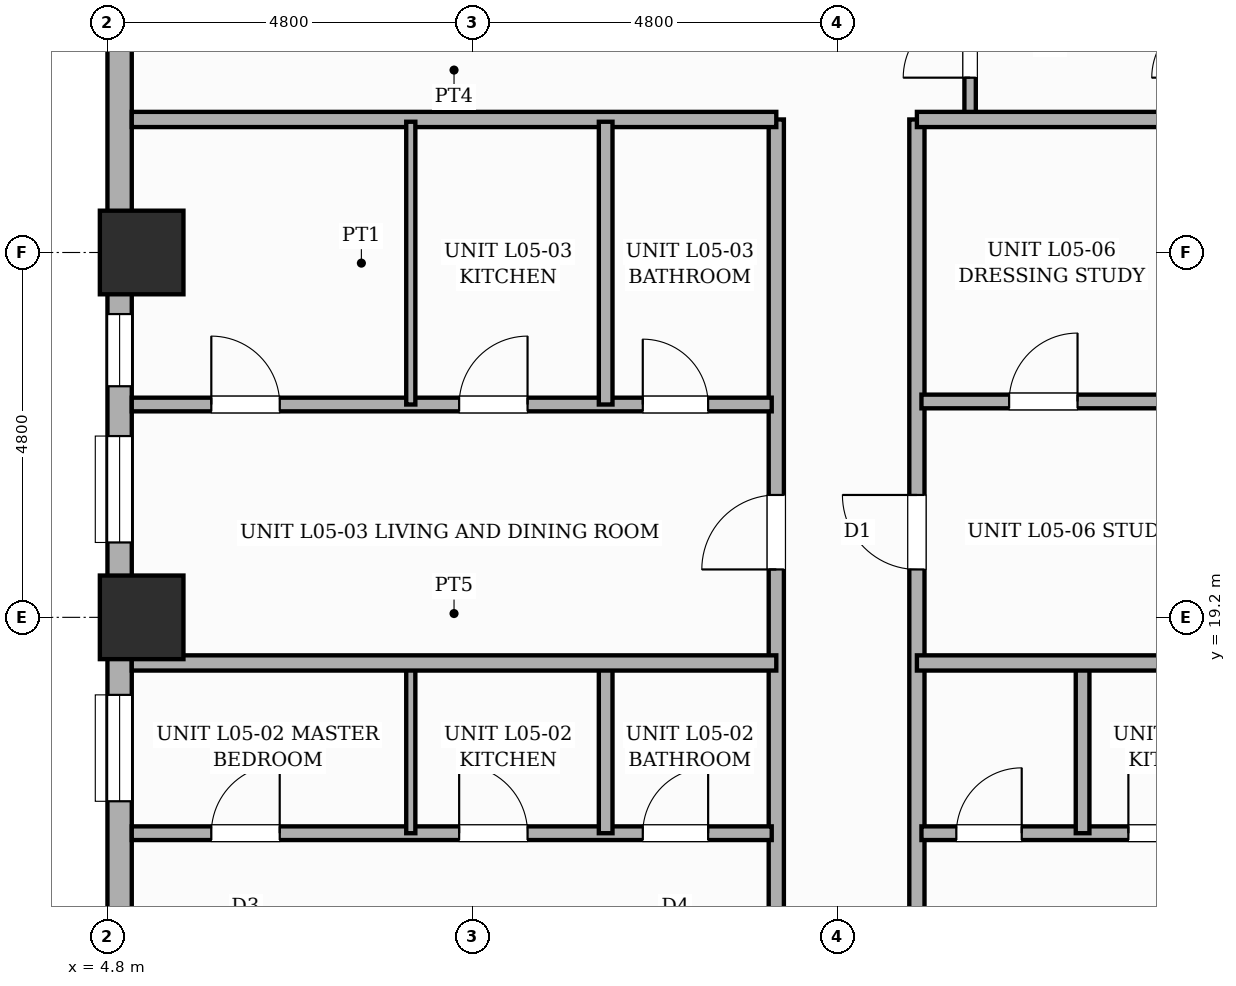
"""IFC4 building model, lengths in metres.
Left out: names, types, materials, properties, quantities, classifications, styles, units other than length and angle.
Written with IfcOpenShell. Run it as: python <this file> out.ifc"""

import sys

from ifc_helpers import new_model, si_unit, direction, frame, frame_2d, origin, origin_2d, place, context, subcontext, project, spatial, rectangle, extrude, element, fill, save


model = new_model("IFC4")
c1 = context("Model", 3, precision=1e-05, world=origin(), true_north=direction((0.0, 1.0)))
c2 = subcontext(c1, "Body", "Model", "MODEL_VIEW")
j1 = project(units=[si_unit("LENGTHUNIT", "METRE"), si_unit("PLANEANGLEUNIT", "RADIAN")], contexts=[c1])
p1 = place(None, origin())
s1 = spatial("IfcSite", under=j1, at=p1, CompositionType="ELEMENT")
p2 = place(p1, origin())
s2 = spatial("IfcBuilding", under=s1, at=p2, CompositionType="ELEMENT")
p3 = place(p2, frame((0.0, 0.0, 25.0)))
s3 = spatial("IfcBuildingStorey", under=s2, at=p3, CompositionType="ELEMENT", Elevation=25.0)
for number, where, z_axis, x_axis in (
    (1, (5.25, 19.2, 0.0), (0.0, 0.0, 1.0), (1.0, 0.0, 0.0)),
    (2, (5.25, 24.0, 0.0), (0.0, 0.0, 1.0), (1.0, 0.0, 0.0)),
):
    element("IfcColumn", number, at=place(p3, frame(where, z_axis=z_axis, x_axis=x_axis)), inside=s3, PredefinedType="COLUMN", context=c2, shape_type="SweptSolid", body=[
        extrude(rectangle(XDim=1.1, YDim=1.1, at=origin_2d()), origin(), (0.0, 0.0, 1.0), 3.6),
    ])
p4 = place(p3, frame((4.96, 7.2, 0.0), z_axis=(0.0, 0.0, 1.0), x_axis=(0.0, 1.0, 0.0)))
e3 = element("IfcWall", 3, at=p4, inside=s3, PredefinedType="STANDARD", context=c2, shape_type="SweptSolid", body=[
    extrude(rectangle(XDim=38.4, YDim=0.32, at=frame_2d((19.2, 0.0))), origin(), (0.0, 0.0, 1.0), 2.53),
])
p5 = place(p4, frame((0.635, 0.0, 0.45)))
e4 = element("IfcOpeningElement", 4, at=p5, cuts=e3, PredefinedType="OPENING", context=c2, shape_type="SweptSolid", body=[
    extrude(rectangle(XDim=0.95, YDim=1.8, at=frame_2d((0.475, 0.9))), frame((0.0, 0.17, 0.0), z_axis=(0.0, -1.0, 0.0), x_axis=(1.0, 0.0, 0.0)), (0.0, 0.0, 1.0), 0.34),
])
p6 = place(p4, frame((9.58, 0.0, 0.65)))
e5 = element("IfcOpeningElement", 5, at=p6, cuts=e3, PredefinedType="OPENING", context=c2, shape_type="SweptSolid", body=[
    extrude(rectangle(XDim=1.4, YDim=1.1, at=frame_2d((0.7, 0.55))), frame((0.0, 0.17, 0.0), z_axis=(0.0, -1.0, 0.0), x_axis=(1.0, 0.0, 0.0)), (0.0, 0.0, 1.0), 0.34),
])
p7 = place(p4, frame((15.04, 0.0, 0.45)))
e6 = element("IfcOpeningElement", 6, at=p7, cuts=e3, PredefinedType="OPENING", context=c2, shape_type="SweptSolid", body=[
    extrude(rectangle(XDim=0.95, YDim=1.8, at=frame_2d((0.475, 0.9))), frame((0.0, 0.17, 0.0), z_axis=(0.0, -1.0, 0.0), x_axis=(1.0, 0.0, 0.0)), (0.0, 0.0, 1.0), 0.34),
])
p8 = place(p4, frame((4.815, 0.0, 0.65)))
e7 = element("IfcOpeningElement", 7, at=p8, cuts=e3, PredefinedType="OPENING", context=c2, shape_type="SweptSolid", body=[
    extrude(rectangle(XDim=1.4, YDim=1.1, at=frame_2d((0.7, 0.55))), frame((0.0, 0.17, 0.0), z_axis=(0.0, -1.0, 0.0), x_axis=(1.0, 0.0, 0.0)), (0.0, 0.0, 1.0), 0.34),
])
p9 = place(p4, frame((12.985, 0.0, 0.65)))
e8 = element("IfcOpeningElement", 8, at=p9, cuts=e3, PredefinedType="OPENING", context=c2, shape_type="SweptSolid", body=[
    extrude(rectangle(XDim=1.4, YDim=1.1, at=frame_2d((0.7, 0.55))), frame((0.0, 0.17, 0.0), z_axis=(0.0, -1.0, 0.0), x_axis=(1.0, 0.0, 0.0)), (0.0, 0.0, 1.0), 0.34),
])
p10 = place(p3, frame((16.15, 25.75, 0.0), z_axis=(0.0, 0.0, 1.0), x_axis=(0.0, 1.0, 0.0)))
e9 = element("IfcWall", 9, at=p10, inside=s3, PredefinedType="PARTITIONING", context=c2, shape_type="SweptSolid", body=[
    extrude(rectangle(XDim=2.25, YDim=0.15, at=frame_2d((1.125, 0.0))), origin(), (0.0, 0.0, 1.0), 3.35),
])
p11 = place(p10, frame((0.55, 0.0, 0.0)))
e10 = element("IfcOpeningElement", 10, at=p11, cuts=e9, PredefinedType="OPENING", context=c2, shape_type="SweptSolid", body=[
    extrude(rectangle(XDim=0.88, YDim=2.1, at=frame_2d((0.44, 1.05))), frame((0.0, 0.085, 0.0), z_axis=(0.0, -1.0, 0.0), x_axis=(1.0, 0.0, 0.0)), (0.0, 0.0, 1.0), 0.17),
])
p12 = place(p3, frame((13.6, 5.12, 0.0), z_axis=(0.0, 0.0, 1.0), x_axis=(0.0, 1.0, 0.0)))
e11 = element("IfcWall", 11, at=p12, inside=s3, PredefinedType="PARTITIONING", context=c2, shape_type="SweptSolid", body=[
    extrude(rectangle(XDim=20.63, YDim=0.2, at=frame_2d((10.315, 0.0))), origin(), (0.0, 0.0, 1.0), 3.35),
])
p13 = place(p12, frame((1.025, 0.0, 0.0)))
e12 = element("IfcOpeningElement", 12, at=p13, cuts=e11, PredefinedType="OPENING", context=c2, shape_type="SweptSolid", body=[
    extrude(rectangle(XDim=0.98, YDim=2.18, at=frame_2d((0.49, 1.09))), frame((0.0, 0.11, 0.0), z_axis=(0.0, -1.0, 0.0), x_axis=(1.0, 0.0, 0.0)), (0.0, 0.0, 1.0), 0.22),
])
p14 = place(p12, frame((8.39, 0.0, 0.0)))
e13 = element("IfcOpeningElement", 13, at=p14, cuts=e11, PredefinedType="OPENING", context=c2, shape_type="SweptSolid", body=[
    extrude(rectangle(XDim=0.98, YDim=2.18, at=frame_2d((0.49, 1.09))), frame((0.0, 0.11, 0.0), z_axis=(0.0, -1.0, 0.0), x_axis=(1.0, 0.0, 0.0)), (0.0, 0.0, 1.0), 0.22),
])
p15 = place(p12, frame((14.71, 0.0, 0.0)))
e14 = element("IfcOpeningElement", 14, at=p15, cuts=e11, PredefinedType="OPENING", context=c2, shape_type="SweptSolid", body=[
    extrude(rectangle(XDim=0.98, YDim=2.18, at=frame_2d((0.49, 1.09))), frame((0.0, 0.11, 0.0), z_axis=(0.0, -1.0, 0.0), x_axis=(1.0, 0.0, 0.0)), (0.0, 0.0, 1.0), 0.22),
])
p16 = place(p3, frame((15.45, 5.12, 0.0), z_axis=(0.0, 0.0, 1.0), x_axis=(0.0, 1.0, 0.0)))
e15 = element("IfcWall", 15, at=p16, inside=s3, PredefinedType="PARTITIONING", context=c2, shape_type="SweptSolid", body=[
    extrude(rectangle(XDim=20.63, YDim=0.2, at=frame_2d((10.315, 0.0))), origin(), (0.0, 0.0, 1.0), 3.35),
])
p17 = place(p16, frame((1.025, 0.0, 0.0)))
e16 = element("IfcOpeningElement", 16, at=p17, cuts=e15, PredefinedType="OPENING", context=c2, shape_type="SweptSolid", body=[
    extrude(rectangle(XDim=0.98, YDim=2.18, at=frame_2d((0.49, 1.09))), frame((0.0, 0.11, 0.0), z_axis=(0.0, -1.0, 0.0), x_axis=(1.0, 0.0, 0.0)), (0.0, 0.0, 1.0), 0.22),
])
p18 = place(p16, frame((8.39, 0.0, 0.0)))
e17 = element("IfcOpeningElement", 17, at=p18, cuts=e15, PredefinedType="OPENING", context=c2, shape_type="SweptSolid", body=[
    extrude(rectangle(XDim=0.98, YDim=2.18, at=frame_2d((0.49, 1.09))), frame((0.0, 0.11, 0.0), z_axis=(0.0, -1.0, 0.0), x_axis=(1.0, 0.0, 0.0)), (0.0, 0.0, 1.0), 0.22),
])
p19 = place(p16, frame((14.71, 0.0, 0.0)))
e18 = element("IfcOpeningElement", 18, at=p19, cuts=e15, PredefinedType="OPENING", context=c2, shape_type="SweptSolid", body=[
    extrude(rectangle(XDim=0.98, YDim=2.18, at=frame_2d((0.49, 1.09))), frame((0.0, 0.11, 0.0), z_axis=(0.0, -1.0, 0.0), x_axis=(1.0, 0.0, 0.0)), (0.0, 0.0, 1.0), 0.22),
])
p20 = place(p3, frame((5.12, 25.75, 0.0), z_axis=(0.0, 0.0, 1.0), x_axis=(1.0, 0.0, 0.0)))
e19 = element("IfcWall", 19, at=p20, inside=s3, PredefinedType="PARTITIONING", context=c2, shape_type="SweptSolid", body=[
    extrude(rectangle(XDim=8.48, YDim=0.2, at=frame_2d((4.24, 0.0))), origin(), (0.0, 0.0, 1.0), 3.35),
])
p21 = place(p3, frame((15.45, 25.75, 0.0), z_axis=(0.0, 0.0, 1.0), x_axis=(1.0, 0.0, 0.0)))
e20 = element("IfcWall", 20, at=p21, inside=s3, PredefinedType="PARTITIONING", context=c2, shape_type="SweptSolid", body=[
    extrude(rectangle(XDim=8.23, YDim=0.2, at=frame_2d((4.115, 0.0))), origin(), (0.0, 0.0, 1.0), 3.35),
])
p22 = place(p3, frame((5.12, 16.36, 0.0), z_axis=(0.0, 0.0, 1.0), x_axis=(1.0, 0.0, 0.0)))
e21 = element("IfcWall", 21, at=p22, inside=s3, PredefinedType="PLUMBINGWALL", context=c2, shape_type="SweptSolid", body=[
    extrude(rectangle(XDim=8.42, YDim=0.18, at=frame_2d((4.21, 0.0))), origin(), (0.0, 0.0, 1.0), 3.35),
])
p23 = place(p22, frame((1.046, 0.0, 0.0)))
e22 = element("IfcOpeningElement", 22, at=p23, cuts=e21, PredefinedType="OPENING", context=c2, shape_type="SweptSolid", body=[
    extrude(rectangle(XDim=0.9, YDim=2.15, at=frame_2d((0.45, 1.075))), frame((0.0, 0.1, 0.0), z_axis=(0.0, -1.0, 0.0), x_axis=(1.0, 0.0, 0.0)), (0.0, 0.0, 1.0), 0.2),
])
p24 = place(p22, frame((4.307, 0.0, 0.0)))
e23 = element("IfcOpeningElement", 23, at=p24, cuts=e21, PredefinedType="OPENING", context=c2, shape_type="SweptSolid", body=[
    extrude(rectangle(XDim=0.9, YDim=2.15, at=frame_2d((0.45, 1.075))), frame((0.0, 0.1, 0.0), z_axis=(0.0, -1.0, 0.0), x_axis=(1.0, 0.0, 0.0)), (0.0, 0.0, 1.0), 0.2),
])
p25 = place(p22, frame((6.723, 0.0, 0.0)))
e24 = element("IfcOpeningElement", 24, at=p25, cuts=e21, PredefinedType="OPENING", context=c2, shape_type="SweptSolid", body=[
    extrude(rectangle(XDim=0.86, YDim=2.1, at=frame_2d((0.43, 1.05))), frame((0.0, 0.1, 0.0), z_axis=(0.0, -1.0, 0.0), x_axis=(1.0, 0.0, 0.0)), (0.0, 0.0, 1.0), 0.2),
])
p26 = place(p3, frame((8.791, 16.36, 0.0), z_axis=(0.0, 0.0, 1.0), x_axis=(0.0, 1.0, 0.0)))
e25 = element("IfcWall", 25, at=p26, inside=s3, PredefinedType="PARTITIONING", context=c2, shape_type="SweptSolid", body=[
    extrude(rectangle(XDim=2.28, YDim=0.12, at=frame_2d((1.14, 0.0))), origin(), (0.0, 0.0, 1.0), 3.35),
])
p27 = place(p3, frame((11.355, 16.36, 0.0), z_axis=(0.0, 0.0, 1.0), x_axis=(0.0, 1.0, 0.0)))
e26 = element("IfcWall", 26, at=p27, inside=s3, PredefinedType="PLUMBINGWALL", context=c2, shape_type="SweptSolid", body=[
    extrude(rectangle(XDim=2.28, YDim=0.18, at=frame_2d((1.14, 0.0))), origin(), (0.0, 0.0, 1.0), 3.35),
])
p28 = place(p3, frame((5.12, 18.6, 0.0), z_axis=(0.0, 0.0, 1.0), x_axis=(1.0, 0.0, 0.0)))
e27 = element("IfcWall", 27, at=p28, inside=s3, PredefinedType="SOLIDWALL", context=c2, shape_type="SweptSolid", body=[
    extrude(rectangle(XDim=8.48, YDim=0.2, at=frame_2d((4.24, 0.0))), origin(), (0.0, 0.0, 1.0), 3.35),
])
p29 = place(p3, frame((5.12, 22.0, 0.0), z_axis=(0.0, 0.0, 1.0), x_axis=(1.0, 0.0, 0.0)))
e28 = element("IfcWall", 28, at=p29, inside=s3, PredefinedType="PLUMBINGWALL", context=c2, shape_type="SweptSolid", body=[
    extrude(rectangle(XDim=8.42, YDim=0.18, at=frame_2d((4.21, 0.0))), origin(), (0.0, 0.0, 1.0), 3.35),
])
p30 = place(p29, frame((1.046, 0.0, 0.0)))
e29 = element("IfcOpeningElement", 29, at=p30, cuts=e28, PredefinedType="OPENING", context=c2, shape_type="SweptSolid", body=[
    extrude(rectangle(XDim=0.9, YDim=2.15, at=frame_2d((0.45, 1.075))), frame((0.0, 0.1, 0.0), z_axis=(0.0, -1.0, 0.0), x_axis=(1.0, 0.0, 0.0)), (0.0, 0.0, 1.0), 0.2),
])
p31 = place(p29, frame((4.307, 0.0, 0.0)))
e30 = element("IfcOpeningElement", 30, at=p31, cuts=e28, PredefinedType="OPENING", context=c2, shape_type="SweptSolid", body=[
    extrude(rectangle(XDim=0.9, YDim=2.15, at=frame_2d((0.45, 1.075))), frame((0.0, 0.1, 0.0), z_axis=(0.0, -1.0, 0.0), x_axis=(1.0, 0.0, 0.0)), (0.0, 0.0, 1.0), 0.2),
])
p32 = place(p29, frame((6.723, 0.0, 0.0)))
e31 = element("IfcOpeningElement", 31, at=p32, cuts=e28, PredefinedType="OPENING", context=c2, shape_type="SweptSolid", body=[
    extrude(rectangle(XDim=0.86, YDim=2.1, at=frame_2d((0.43, 1.05))), frame((0.0, 0.1, 0.0), z_axis=(0.0, -1.0, 0.0), x_axis=(1.0, 0.0, 0.0)), (0.0, 0.0, 1.0), 0.2),
])
p33 = place(p3, frame((8.791, 22.0, 0.0), z_axis=(0.0, 0.0, 1.0), x_axis=(0.0, 1.0, 0.0)))
e32 = element("IfcWall", 32, at=p33, inside=s3, PredefinedType="PARTITIONING", context=c2, shape_type="SweptSolid", body=[
    extrude(rectangle(XDim=3.72, YDim=0.12, at=frame_2d((1.86, 0.0))), origin(), (0.0, 0.0, 1.0), 3.35),
])
p34 = place(p3, frame((11.355, 22.0, 0.0), z_axis=(0.0, 0.0, 1.0), x_axis=(0.0, 1.0, 0.0)))
e33 = element("IfcWall", 33, at=p34, inside=s3, PredefinedType="PLUMBINGWALL", context=c2, shape_type="SweptSolid", body=[
    extrude(rectangle(XDim=3.72, YDim=0.18, at=frame_2d((1.86, 0.0))), origin(), (0.0, 0.0, 1.0), 3.35),
])
p35 = place(p3, frame((15.51, 16.36, 0.0), z_axis=(0.0, 0.0, 1.0), x_axis=(1.0, 0.0, 0.0)))
e34 = element("IfcWall", 34, at=p35, inside=s3, PredefinedType="PLUMBINGWALL", context=c2, shape_type="SweptSolid", body=[
    extrude(rectangle(XDim=8.17, YDim=0.18, at=frame_2d((4.085, 0.0))), origin(), (0.0, 0.0, 1.0), 3.35),
])
p36 = place(p35, frame((0.459, 0.0, 0.0)))
e35 = element("IfcOpeningElement", 35, at=p36, cuts=e34, PredefinedType="OPENING", context=c2, shape_type="SweptSolid", body=[
    extrude(rectangle(XDim=0.86, YDim=2.1, at=frame_2d((0.43, 1.05))), frame((0.0, 0.1, 0.0), z_axis=(0.0, -1.0, 0.0), x_axis=(1.0, 0.0, 0.0)), (0.0, 0.0, 1.0), 0.2),
])
p37 = place(p35, frame((2.722, 0.0, 0.0)))
e36 = element("IfcOpeningElement", 36, at=p37, cuts=e34, PredefinedType="OPENING", context=c2, shape_type="SweptSolid", body=[
    extrude(rectangle(XDim=0.9, YDim=2.15, at=frame_2d((0.45, 1.075))), frame((0.0, 0.1, 0.0), z_axis=(0.0, -1.0, 0.0), x_axis=(1.0, 0.0, 0.0)), (0.0, 0.0, 1.0), 0.2),
])
p38 = place(p35, frame((5.766, 0.0, 0.0)))
e37 = element("IfcOpeningElement", 37, at=p38, cuts=e34, PredefinedType="OPENING", context=c2, shape_type="SweptSolid", body=[
    extrude(rectangle(XDim=0.9, YDim=2.15, at=frame_2d((0.45, 1.075))), frame((0.0, 0.1, 0.0), z_axis=(0.0, -1.0, 0.0), x_axis=(1.0, 0.0, 0.0)), (0.0, 0.0, 1.0), 0.2),
])
p39 = place(p3, frame((17.63, 16.36, 0.0), z_axis=(0.0, 0.0, 1.0), x_axis=(0.0, 1.0, 0.0)))
e38 = element("IfcWall", 38, at=p39, inside=s3, PredefinedType="PLUMBINGWALL", context=c2, shape_type="SweptSolid", body=[
    extrude(rectangle(XDim=2.28, YDim=0.18, at=frame_2d((1.14, 0.0))), origin(), (0.0, 0.0, 1.0), 3.35),
])
p40 = place(p3, frame((15.45, 18.6, 0.0), z_axis=(0.0, 0.0, 1.0), x_axis=(1.0, 0.0, 0.0)))
e39 = element("IfcWall", 39, at=p40, inside=s3, PredefinedType="SOLIDWALL", context=c2, shape_type="SweptSolid", body=[
    extrude(rectangle(XDim=8.23, YDim=0.2, at=frame_2d((4.115, 0.0))), origin(), (0.0, 0.0, 1.0), 3.35),
])
p41 = place(p3, frame((15.51, 22.04, 0.0), z_axis=(0.0, 0.0, 1.0), x_axis=(1.0, 0.0, 0.0)))
e40 = element("IfcWall", 40, at=p41, inside=s3, PredefinedType="PLUMBINGWALL", context=c2, shape_type="SweptSolid", body=[
    extrude(rectangle(XDim=8.17, YDim=0.18, at=frame_2d((4.085, 0.0))), origin(), (0.0, 0.0, 1.0), 3.35),
])
p42 = place(p41, frame((1.154, 0.0, 0.0)))
e41 = element("IfcOpeningElement", 41, at=p42, cuts=e40, PredefinedType="OPENING", context=c2, shape_type="SweptSolid", body=[
    extrude(rectangle(XDim=0.9, YDim=2.15, at=frame_2d((0.45, 1.075))), frame((0.0, 0.1, 0.0), z_axis=(0.0, -1.0, 0.0), x_axis=(1.0, 0.0, 0.0)), (0.0, 0.0, 1.0), 0.2),
])
p43 = place(p41, frame((4.116, 0.0, 0.0)))
e42 = element("IfcOpeningElement", 42, at=p43, cuts=e40, PredefinedType="OPENING", context=c2, shape_type="SweptSolid", body=[
    extrude(rectangle(XDim=0.9, YDim=2.15, at=frame_2d((0.45, 1.075))), frame((0.0, 0.1, 0.0), z_axis=(0.0, -1.0, 0.0), x_axis=(1.0, 0.0, 0.0)), (0.0, 0.0, 1.0), 0.2),
])
p44 = place(p41, frame((6.553, 0.0, 0.0)))
e43 = element("IfcOpeningElement", 43, at=p44, cuts=e40, PredefinedType="OPENING", context=c2, shape_type="SweptSolid", body=[
    extrude(rectangle(XDim=0.86, YDim=2.1, at=frame_2d((0.43, 1.05))), frame((0.0, 0.1, 0.0), z_axis=(0.0, -1.0, 0.0), x_axis=(1.0, 0.0, 0.0)), (0.0, 0.0, 1.0), 0.2),
])
p45 = place(p6, origin())
e44 = element("IfcWindow", 44, at=p45, inside=s3, PartitioningType="SINGLE_PANEL", PredefinedType="WINDOW", context=c2, shape_type="SweptSolid", body=[
    extrude(rectangle(XDim=1.4, YDim=1.1, at=frame_2d((0.7, 0.55))), frame((0.0, 0.03, 0.0), z_axis=(0.0, -1.0, 0.0), x_axis=(1.0, 0.0, 0.0)), (0.0, 0.0, 1.0), 0.06),
])
fill(e5, e44)
p46 = place(p7, origin())
e45 = element("IfcWindow", 45, at=p46, inside=s3, PartitioningType="SINGLE_PANEL", PredefinedType="WINDOW", context=c2, shape_type="SweptSolid", body=[
    extrude(rectangle(XDim=0.95, YDim=1.8, at=frame_2d((0.475, 0.9))), frame((0.0, 0.03, 0.0), z_axis=(0.0, -1.0, 0.0), x_axis=(1.0, 0.0, 0.0)), (0.0, 0.0, 1.0), 0.06),
])
fill(e6, e45)
p47 = place(p9, origin())
e46 = element("IfcWindow", 46, at=p47, inside=s3, PartitioningType="SINGLE_PANEL", PredefinedType="WINDOW", context=c2, shape_type="SweptSolid", body=[
    extrude(rectangle(XDim=1.4, YDim=1.1, at=frame_2d((0.7, 0.55))), frame((0.0, 0.03, 0.0), z_axis=(0.0, -1.0, 0.0), x_axis=(1.0, 0.0, 0.0)), (0.0, 0.0, 1.0), 0.06),
])
fill(e8, e46)
p48 = place(p11, origin())
e47 = element("IfcDoor", 47, at=p48, inside=s3, OperationType="SINGLE_SWING_LEFT", PredefinedType="DOOR", context=c2, shape_type="SweptSolid", body=[
    extrude(rectangle(XDim=0.88, YDim=2.1, at=frame_2d((0.44, 1.05))), frame((0.0, 0.025, 0.0), z_axis=(0.0, -1.0, 0.0), x_axis=(1.0, 0.0, 0.0)), (0.0, 0.0, 1.0), 0.05),
])
fill(e10, e47)
p49 = place(p23, origin())
e48 = element("IfcDoor", 48, at=p49, inside=s3, OperationType="SINGLE_SWING_RIGHT", PredefinedType="DOOR", context=c2, shape_type="SweptSolid", body=[
    extrude(rectangle(XDim=0.9, YDim=2.15, at=frame_2d((0.45, 1.075))), frame((0.0, 0.025, 0.0), z_axis=(0.0, -1.0, 0.0), x_axis=(1.0, 0.0, 0.0)), (0.0, 0.0, 1.0), 0.05),
])
fill(e22, e48)
p50 = place(p24, origin())
e49 = element("IfcDoor", 49, at=p50, inside=s3, OperationType="SINGLE_SWING_LEFT", PredefinedType="DOOR", context=c2, shape_type="SweptSolid", body=[
    extrude(rectangle(XDim=0.9, YDim=2.15, at=frame_2d((0.45, 1.075))), frame((0.0, 0.025, 0.0), z_axis=(0.0, -1.0, 0.0), x_axis=(1.0, 0.0, 0.0)), (0.0, 0.0, 1.0), 0.05),
])
fill(e23, e49)
p51 = place(p25, origin())
e50 = element("IfcDoor", 50, at=p51, inside=s3, OperationType="SINGLE_SWING_RIGHT", PredefinedType="DOOR", context=c2, shape_type="SweptSolid", body=[
    extrude(rectangle(XDim=0.86, YDim=2.1, at=frame_2d((0.43, 1.05))), frame((0.0, 0.025, 0.0), z_axis=(0.0, -1.0, 0.0), x_axis=(1.0, 0.0, 0.0)), (0.0, 0.0, 1.0), 0.05),
])
fill(e24, e50)
p52 = place(p15, origin())
e51 = element("IfcDoor", 51, at=p52, inside=s3, OperationType="SINGLE_SWING_LEFT", PredefinedType="DOOR", context=c2, shape_type="SweptSolid", body=[
    extrude(rectangle(XDim=0.98, YDim=2.18, at=frame_2d((0.49, 1.09))), frame((0.0, 0.025, 0.0), z_axis=(0.0, -1.0, 0.0), x_axis=(1.0, 0.0, 0.0)), (0.0, 0.0, 1.0), 0.05),
])
fill(e14, e51)
p53 = place(p30, origin())
e52 = element("IfcDoor", 52, at=p53, inside=s3, OperationType="SINGLE_SWING_LEFT", PredefinedType="DOOR", context=c2, shape_type="SweptSolid", body=[
    extrude(rectangle(XDim=0.9, YDim=2.15, at=frame_2d((0.45, 1.075))), frame((0.0, 0.025, 0.0), z_axis=(0.0, -1.0, 0.0), x_axis=(1.0, 0.0, 0.0)), (0.0, 0.0, 1.0), 0.05),
])
fill(e29, e52)
p54 = place(p31, origin())
e53 = element("IfcDoor", 53, at=p54, inside=s3, OperationType="SINGLE_SWING_RIGHT", PredefinedType="DOOR", context=c2, shape_type="SweptSolid", body=[
    extrude(rectangle(XDim=0.9, YDim=2.15, at=frame_2d((0.45, 1.075))), frame((0.0, 0.025, 0.0), z_axis=(0.0, -1.0, 0.0), x_axis=(1.0, 0.0, 0.0)), (0.0, 0.0, 1.0), 0.05),
])
fill(e30, e53)
p55 = place(p32, origin())
e54 = element("IfcDoor", 54, at=p55, inside=s3, OperationType="SINGLE_SWING_LEFT", PredefinedType="DOOR", context=c2, shape_type="SweptSolid", body=[
    extrude(rectangle(XDim=0.86, YDim=2.1, at=frame_2d((0.43, 1.05))), frame((0.0, 0.025, 0.0), z_axis=(0.0, -1.0, 0.0), x_axis=(1.0, 0.0, 0.0)), (0.0, 0.0, 1.0), 0.05),
])
fill(e31, e54)
p56 = place(p36, origin())
e55 = element("IfcDoor", 55, at=p56, inside=s3, OperationType="SINGLE_SWING_RIGHT", PredefinedType="DOOR", context=c2, shape_type="SweptSolid", body=[
    extrude(rectangle(XDim=0.86, YDim=2.1, at=frame_2d((0.43, 1.05))), frame((0.0, 0.025, 0.0), z_axis=(0.0, -1.0, 0.0), x_axis=(1.0, 0.0, 0.0)), (0.0, 0.0, 1.0), 0.05),
])
fill(e35, e55)
p57 = place(p37, origin())
e56 = element("IfcDoor", 56, at=p57, inside=s3, OperationType="SINGLE_SWING_LEFT", PredefinedType="DOOR", context=c2, shape_type="SweptSolid", body=[
    extrude(rectangle(XDim=0.9, YDim=2.15, at=frame_2d((0.45, 1.075))), frame((0.0, 0.025, 0.0), z_axis=(0.0, -1.0, 0.0), x_axis=(1.0, 0.0, 0.0)), (0.0, 0.0, 1.0), 0.05),
])
fill(e36, e56)
p58 = place(p19, origin())
e57 = element("IfcDoor", 57, at=p58, inside=s3, OperationType="SINGLE_SWING_RIGHT", PredefinedType="DOOR", context=c2, shape_type="SweptSolid", body=[
    extrude(rectangle(XDim=0.98, YDim=2.18, at=frame_2d((0.49, 1.09))), frame((0.0, 0.025, 0.0), z_axis=(0.0, -1.0, 0.0), x_axis=(1.0, 0.0, 0.0)), (0.0, 0.0, 1.0), 0.05),
])
fill(e18, e57)
p59 = place(p42, origin())
e58 = element("IfcDoor", 58, at=p59, inside=s3, OperationType="SINGLE_SWING_RIGHT", PredefinedType="DOOR", context=c2, shape_type="SweptSolid", body=[
    extrude(rectangle(XDim=0.9, YDim=2.15, at=frame_2d((0.45, 1.075))), frame((0.0, 0.025, 0.0), z_axis=(0.0, -1.0, 0.0), x_axis=(1.0, 0.0, 0.0)), (0.0, 0.0, 1.0), 0.05),
])
fill(e41, e58)
save(model, sys.argv[1])
